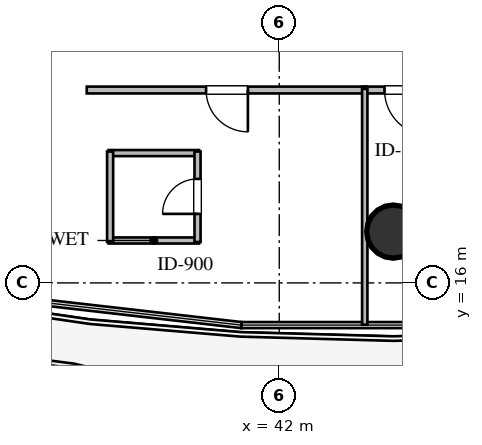
"""IFC4 building model, lengths in metres.
Left out: names, types, materials, properties, quantities, classifications, styles, units other than length and angle.
Written with IfcOpenShell. Run it as: python <this file> out.ifc"""

import sys

from ifc_helpers import new_model, si_unit, direction, frame, frame_2d, origin, origin_2d, place, context, subcontext, project, spatial, rectangle, circle, extrude, element, fill, save


model = new_model("IFC4")
c1 = context("Model", 3, precision=1e-05, world=origin(), true_north=direction((0.0, 1.0)))
c2 = subcontext(c1, "Body", "Model", "MODEL_VIEW")
j1 = project(units=[si_unit("LENGTHUNIT", "METRE"), si_unit("PLANEANGLEUNIT", "RADIAN")], contexts=[c1])
p1 = place(None, origin())
s1 = spatial("IfcSite", under=j1, at=p1, CompositionType="ELEMENT")
p2 = place(p1, origin())
s2 = spatial("IfcBuilding", under=s1, at=p2, CompositionType="ELEMENT")
p3 = place(p2, frame((0.0, 0.0, 52.8)))
s3 = spatial("IfcBuildingStorey", under=s2, at=p3, CompositionType="ELEMENT", Elevation=52.8)
p4 = place(p3, frame((45.0, 17.35, 0.0), z_axis=(0.0, 0.0, 1.0), x_axis=(1.0, 0.0, 0.0)))
e1 = element("IfcColumn", 1, at=p4, inside=s3, PredefinedType="COLUMN", context=c2, shape_type="SweptSolid", body=[
    extrude(circle(Radius=0.7, at=origin_2d()), origin(), (0.0, 0.0, 1.0), 3.6),
])
for number, where, z_axis, x_axis in (
    (2, (37.51, 17.116, 0.0), (0.0, 0.0, 1.0), (1.0, 0.0, 0.0)),
    (3, (37.51, 19.416, 0.0), (0.0, 0.0, 1.0), (1.0, 0.0, 0.0)),
):
    element("IfcWall", number, at=place(p3, frame(where, z_axis=z_axis, x_axis=x_axis)), inside=s3, PredefinedType="PLUMBINGWALL", context=c2, shape_type="SweptSolid", body=[
        extrude(rectangle(XDim=2.38, YDim=0.16, at=frame_2d((1.19, 0.0))), origin(), (0.0, 0.0, 1.0), 3.36),
    ])
p5 = place(p3, frame((37.55, 17.076, 0.0), z_axis=(0.0, 0.0, 1.0), x_axis=(0.0, 1.0, 0.0)))
e4 = element("IfcWall", 4, at=p5, inside=s3, PredefinedType="PLUMBINGWALL", context=c2, shape_type="SweptSolid", body=[
    extrude(rectangle(XDim=2.38, YDim=0.16, at=frame_2d((1.19, 0.0))), origin(), (0.0, 0.0, 1.0), 3.36),
])
p6 = place(p3, frame((39.85, 17.076, 0.0), z_axis=(0.0, 0.0, 1.0), x_axis=(0.0, 1.0, 0.0)))
e5 = element("IfcWall", 5, at=p6, inside=s3, PredefinedType="PLUMBINGWALL", context=c2, shape_type="SweptSolid", body=[
    extrude(rectangle(XDim=2.38, YDim=0.16, at=frame_2d((1.19, 0.0))), origin(), (0.0, 0.0, 1.0), 3.36),
])
p7 = place(p6, frame((0.74, 0.0, 0.0)))
e6 = element("IfcOpeningElement", 6, at=p7, cuts=e5, PredefinedType="OPENING", context=c2, shape_type="SweptSolid", body=[
    extrude(rectangle(XDim=0.92, YDim=2.1, at=frame_2d((0.46, 1.05))), frame((0.0, 0.09, 0.0), z_axis=(0.0, -1.0, 0.0), x_axis=(1.0, 0.0, 0.0)), (0.0, 0.0, 1.0), 0.18),
])
p8 = place(p3, frame((44.315, 21.075, 0.0), z_axis=(0.0, 0.0, 1.0), x_axis=(-1.0, 0.0, 0.0)))
e7 = element("IfcWall", 7, at=p8, inside=s3, PredefinedType="PARTITIONING", context=c2, shape_type="SweptSolid", body=[
    extrude(rectangle(XDim=7.38, YDim=0.18, at=frame_2d((3.69, 0.0))), origin(), (0.0, 0.0, 1.0), 2.996),
])
p9 = place(p8, frame((3.14, 0.0, 0.0)))
e8 = element("IfcOpeningElement", 8, at=p9, cuts=e7, PredefinedType="OPENING", context=c2, shape_type="SweptSolid", body=[
    extrude(rectangle(XDim=1.1, YDim=2.1, at=frame_2d((0.55, 1.05))), frame((0.0, 0.1, 0.0), z_axis=(0.0, -1.0, 0.0), x_axis=(1.0, 0.0, 0.0)), (0.0, 0.0, 1.0), 0.2),
])
p10 = place(p3, frame((46.555, 21.075, 0.0), z_axis=(0.0, 0.0, 1.0), x_axis=(-1.0, 0.0, 0.0)))
e9 = element("IfcWall", 9, at=p10, inside=s3, PredefinedType="PARTITIONING", context=c2, shape_type="SweptSolid", body=[
    extrude(rectangle(XDim=2.37, YDim=0.18, at=frame_2d((1.185, 0.0))), origin(), (0.0, 0.0, 1.0), 3.36),
])
p11 = place(p10, frame((0.585, 0.0, 0.0)))
e10 = element("IfcOpeningElement", 10, at=p11, cuts=e9, PredefinedType="OPENING", context=c2, shape_type="SweptSolid", body=[
    extrude(rectangle(XDim=1.2, YDim=2.15, at=frame_2d((0.6, 1.075))), frame((0.0, 0.1, 0.0), z_axis=(0.0, -1.0, 0.0), x_axis=(1.0, 0.0, 0.0)), (0.0, 0.0, 1.0), 0.2),
])
p12 = place(p3, frame((44.25, 21.105, 0.0), z_axis=(0.0, 0.0, 1.0), x_axis=(0.0, -1.0, 0.0)))
e11 = element("IfcWall", 11, at=p12, inside=s3, PredefinedType="PARTITIONING", context=c2, shape_type="SweptSolid", body=[
    extrude(rectangle(XDim=6.205, YDim=0.14, at=frame_2d((3.103, 0.0))), origin(), (0.0, 0.0, 1.0), 2.89),
])
p13 = place(p7, origin())
e12 = element("IfcDoor", 12, at=p13, inside=s3, OperationType="SINGLE_SWING_LEFT", PredefinedType="DOOR", context=c2, shape_type="SweptSolid", body=[
    extrude(rectangle(XDim=0.92, YDim=2.1, at=frame_2d((0.46, 1.05))), frame((0.0, 0.025, 0.0), z_axis=(0.0, -1.0, 0.0), x_axis=(1.0, 0.0, 0.0)), (0.0, 0.0, 1.0), 0.05),
])
fill(e6, e12)
p14 = place(p9, origin())
e13 = element("IfcDoor", 13, at=p14, inside=s3, OperationType="SINGLE_SWING_LEFT", PredefinedType="DOOR", context=c2, shape_type="SweptSolid", body=[
    extrude(rectangle(XDim=1.1, YDim=2.1, at=frame_2d((0.55, 1.05))), frame((0.0, 0.025, 0.0), z_axis=(0.0, -1.0, 0.0), x_axis=(1.0, 0.0, 0.0)), (0.0, 0.0, 1.0), 0.05),
])
fill(e8, e13)
p15 = place(p11, origin())
e14 = element("IfcDoor", 14, at=p15, inside=s3, OperationType="SINGLE_SWING_LEFT", PredefinedType="DOOR", context=c2, shape_type="SweptSolid", body=[
    extrude(rectangle(XDim=1.2, YDim=2.15, at=frame_2d((0.6, 1.075))), frame((0.0, 0.025, 0.0), z_axis=(0.0, -1.0, 0.0), x_axis=(1.0, 0.0, 0.0)), (0.0, 0.0, 1.0), 0.05),
])
fill(e10, e14)
save(model, sys.argv[1])
